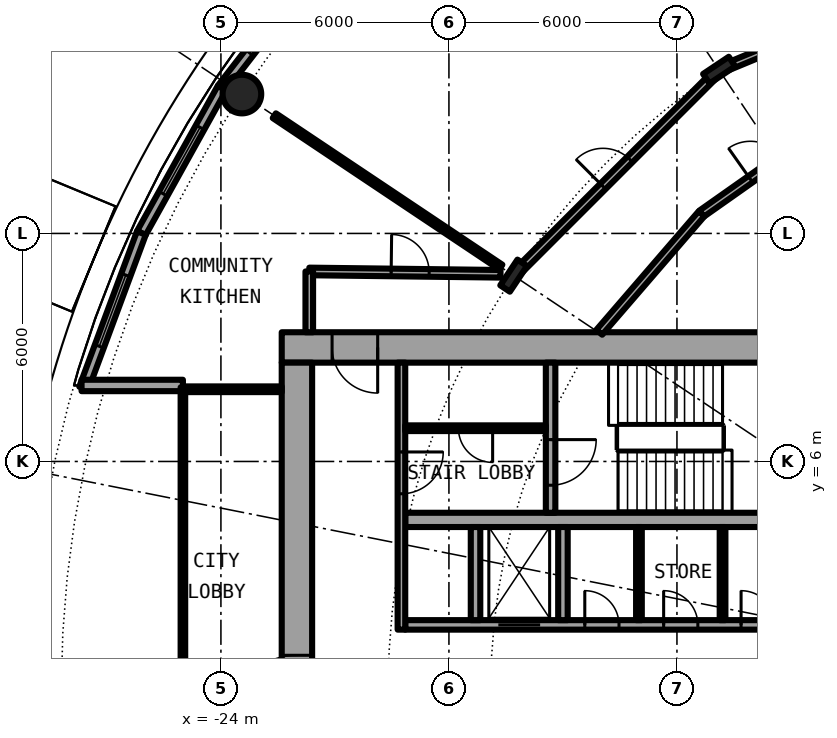
"""IFC4 building model, lengths in metres.
Left out: names, types, materials, properties, quantities, classifications, styles, units other than length and angle.
Written with IfcOpenShell. Run it as: python <this file> out.ifc"""

import sys

from ifc_helpers import new_model, si_unit, direction, frame, frame_2d, origin, origin_2d, place, context, subcontext, project, spatial, rectangle, hollow_circle, i_section, extrude, element, fill, save


model = new_model("IFC4")
c1 = context("Model", 3, precision=1e-05, world=origin(), true_north=direction((0.0, 1.0)))
c2 = subcontext(c1, "Body", "Model", "MODEL_VIEW")
j1 = project(units=[si_unit("LENGTHUNIT", "METRE"), si_unit("PLANEANGLEUNIT", "RADIAN")], contexts=[c1])
p1 = place(None, origin())
s1 = spatial("IfcSite", under=j1, at=p1, CompositionType="ELEMENT")
p2 = place(p1, origin())
s2 = spatial("IfcBuilding", under=s1, at=p2, CompositionType="ELEMENT")
p3 = place(p2, frame((0.0, 0.0, 9.6)))
s3 = spatial("IfcBuildingStorey", under=s2, at=p3, CompositionType="ELEMENT", Elevation=9.6)
p4 = place(p3, frame((-23.448, 15.667, 0.0), z_axis=(0.0, 0.0, 1.0), x_axis=(1.0, 0.0, 0.0)))
e1 = element("IfcColumn", 1, at=p4, inside=s3, PredefinedType="COLUMN", context=c2, shape_type="SweptSolid", body=[
    extrude(hollow_circle(Radius=0.508, WallThickness=0.05, at=origin_2d()), origin(), (0.0, 0.0, 1.0), 4.5),
])
for number, where, z_axis, x_axis in (
    (2, (-10.889, 16.297, 0.0), (0.0, 0.0, 1.0), (-0.556, 0.831, 0.0)),
    (3, (-16.297, 10.889, 0.0), (0.0, 0.0, 1.0), (-0.831, 0.556, 0.0)),
):
    element("IfcColumn", number, at=place(p3, frame(where, z_axis=z_axis, x_axis=x_axis)), inside=s3, PredefinedType="COLUMN", context=c2, shape_type="SweptSolid", body=[
        extrude(i_section(OverallWidth=0.303, OverallDepth=0.814, WebThickness=0.021, FlangeThickness=0.04, FilletRadius=0.03, at=origin_2d()), origin(), (0.0, 0.0, 1.0), 4.5),
    ])
p5 = place(p3, frame((-21.304, 19.268, 0.0), z_axis=(0.0, 0.0, 1.0), x_axis=(-0.612637256412, -0.790364214812, 0.0)))
e4 = element("IfcWall", 4, at=p5, inside=s3, PredefinedType="SOLIDWALL", context=c2, shape_type="SweptSolid", body=[
    extrude(rectangle(XDim=4.36, YDim=0.25, at=frame_2d((2.18, 0.0))), origin(), (0.0, 0.0, 1.0), 4.05),
])
p6 = place(p5, frame((1.18, 0.0, 0.9)))
e5 = element("IfcOpeningElement", 5, at=p6, cuts=e4, PredefinedType="OPENING", context=c2, shape_type="SweptSolid", body=[
    extrude(rectangle(XDim=2.0, YDim=2.4, at=frame_2d((1.0, 1.2))), frame((0.0, 0.135, 0.0), z_axis=(0.0, -1.0, 0.0), x_axis=(1.0, 0.0, 0.0)), (0.0, 0.0, 1.0), 0.27),
])
p7 = place(p3, frame((-23.975, 15.822, 0.0), z_axis=(0.0, 0.0, 1.0), x_axis=(-0.485761785263, -0.8740912355, 0.0)))
e6 = element("IfcWall", 6, at=p7, inside=s3, PredefinedType="SOLIDWALL", context=c2, shape_type="SweptSolid", body=[
    extrude(rectangle(XDim=4.36, YDim=0.25, at=frame_2d((2.18, 0.0))), origin(), (0.0, 0.0, 1.0), 4.05),
])
p8 = place(p7, frame((1.18, 0.0, 0.9)))
e7 = element("IfcOpeningElement", 7, at=p8, cuts=e6, PredefinedType="OPENING", context=c2, shape_type="SweptSolid", body=[
    extrude(rectangle(XDim=2.0, YDim=2.4, at=frame_2d((1.0, 1.2))), frame((0.0, 0.135, 0.0), z_axis=(0.0, -1.0, 0.0), x_axis=(1.0, 0.0, 0.0)), (0.0, 0.0, 1.0), 0.27),
])
p9 = place(p3, frame((-26.093, 12.011, 0.0), z_axis=(0.0, 0.0, 1.0), x_axis=(-0.348003729264, -0.937493148998, 0.0)))
e8 = element("IfcWall", 8, at=p9, inside=s3, PredefinedType="SOLIDWALL", context=c2, shape_type="SweptSolid", body=[
    extrude(rectangle(XDim=4.359, YDim=0.25, at=frame_2d((2.18, 0.0))), origin(), (0.0, 0.0, 1.0), 4.05),
])
p10 = place(p9, frame((1.18, 0.0, 0.9)))
e9 = element("IfcOpeningElement", 9, at=p10, cuts=e8, PredefinedType="OPENING", context=c2, shape_type="SweptSolid", body=[
    extrude(rectangle(XDim=2.0, YDim=2.4, at=frame_2d((1.0, 1.2))), frame((0.0, 0.135, 0.0), z_axis=(0.0, -1.0, 0.0), x_axis=(1.0, 0.0, 0.0)), (0.0, 0.0, 1.0), 0.27),
])
p11 = place(p3, frame((-25.0, 8.0, 0.0), z_axis=(0.0, 0.0, 1.0), x_axis=(-1.0, 0.0, 0.0)))
e10 = element("IfcWall", 10, at=p11, inside=s3, PredefinedType="SOLIDWALL", context=c2, shape_type="SweptSolid", body=[
    extrude(rectangle(XDim=2.667, YDim=0.3, at=frame_2d((1.333, 0.0))), origin(), (0.0, 0.0, 1.0), 4.05),
])
p12 = place(p3, frame((-8.2, 9.0, 0.0), z_axis=(0.0, 0.0, 1.0), x_axis=(-1.0, 0.0, 0.0)))
e11 = element("IfcWall", 11, at=p12, inside=s3, PredefinedType="SHEAR", context=c2, shape_type="SweptSolid", body=[
    extrude(rectangle(XDim=14.2, YDim=0.8, at=frame_2d((7.1, 0.0))), origin(), (0.0, 0.0, 1.0), 4.5),
])
p13 = place(p12, frame((11.675, 0.0, 0.0)))
e12 = element("IfcOpeningElement", 12, at=p13, cuts=e11, PredefinedType="OPENING", context=c2, shape_type="SweptSolid", body=[
    extrude(rectangle(XDim=1.2, YDim=2.3, at=frame_2d((0.6, 1.15))), frame((0.0, 0.41, 0.0), z_axis=(0.0, -1.0, 0.0), x_axis=(1.0, 0.0, 0.0)), (0.0, 0.0, 1.0), 0.82),
])
p14 = place(p3, frame((-22.0, -8.6, 0.0), z_axis=(0.0, 0.0, 1.0), x_axis=(0.0, 1.0, 0.0)))
e13 = element("IfcWall", 13, at=p14, inside=s3, PredefinedType="SHEAR", context=c2, shape_type="SweptSolid", body=[
    extrude(rectangle(XDim=17.2, YDim=0.8, at=frame_2d((8.6, 0.0))), origin(), (0.0, 0.0, 1.0), 4.5),
])
p15 = place(p14, frame((7.7, 0.0, 0.0)))
e14 = element("IfcOpeningElement", 14, at=p15, cuts=e13, PredefinedType="OPENING", context=c2, shape_type="SweptSolid", body=[
    extrude(rectangle(XDim=1.8, YDim=2.3, at=frame_2d((0.9, 1.15))), frame((0.0, 0.41, 0.0), z_axis=(0.0, -1.0, 0.0), x_axis=(1.0, 0.0, 0.0)), (0.0, 0.0, 1.0), 0.82),
])
p16 = place(p3, frame((-19.15, 1.7, 0.0), z_axis=(0.0, 0.0, 1.0), x_axis=(1.0, 0.0, 0.0)))
e15 = element("IfcWall", 15, at=p16, inside=s3, PredefinedType="SHEAR", context=c2, shape_type="SweptSolid", body=[
    extrude(rectangle(XDim=10.15, YDim=0.25, at=frame_2d((5.075, 0.0))), origin(), (0.0, 0.0, 1.0), 4.5),
])
p17 = place(p16, frame((2.45, 0.0, 0.0)))
e16 = element("IfcOpeningElement", 16, at=p17, cuts=e15, PredefinedType="OPENING", context=c2, shape_type="SweptSolid", body=[
    extrude(rectangle(XDim=1.1, YDim=2.3, at=frame_2d((0.55, 1.15))), frame((0.0, 0.135, 0.0), z_axis=(0.0, -1.0, 0.0), x_axis=(1.0, 0.0, 0.0)), (0.0, 0.0, 1.0), 0.27),
])
p18 = place(p16, frame((8.837, 0.0, 0.0)))
e17 = element("IfcOpeningElement", 17, at=p18, cuts=e15, PredefinedType="OPENING", context=c2, shape_type="SweptSolid", body=[
    extrude(rectangle(XDim=0.9, YDim=2.3, at=frame_2d((0.45, 1.15))), frame((0.0, 0.135, 0.0), z_axis=(0.0, -1.0, 0.0), x_axis=(1.0, 0.0, 0.0)), (0.0, 0.0, 1.0), 0.27),
])
p19 = place(p16, frame((6.8, 0.0, 0.0)))
e18 = element("IfcOpeningElement", 18, at=p19, cuts=e15, PredefinedType="OPENING", context=c2, shape_type="SweptSolid", body=[
    extrude(rectangle(XDim=0.9, YDim=2.3, at=frame_2d((0.45, 1.15))), frame((0.0, 0.135, 0.0), z_axis=(0.0, -1.0, 0.0), x_axis=(1.0, 0.0, 0.0)), (0.0, 0.0, 1.0), 0.27),
])
p20 = place(p16, frame((4.725, 0.0, 0.0)))
e19 = element("IfcOpeningElement", 19, at=p20, cuts=e15, PredefinedType="OPENING", context=c2, shape_type="SweptSolid", body=[
    extrude(rectangle(XDim=0.9, YDim=2.3, at=frame_2d((0.45, 1.15))), frame((0.0, 0.135, 0.0), z_axis=(0.0, -1.0, 0.0), x_axis=(1.0, 0.0, 0.0)), (0.0, 0.0, 1.0), 0.27),
])
p21 = place(p3, frame((-9.0, 4.462, 0.0), z_axis=(0.0, 0.0, 1.0), x_axis=(-1.0, 0.0, 0.0)))
e20 = element("IfcWall", 20, at=p21, inside=s3, PredefinedType="SHEAR", context=c2, shape_type="SweptSolid", body=[
    extrude(rectangle(XDim=10.15, YDim=0.375, at=frame_2d((5.075, 0.0))), origin(), (0.0, 0.0, 1.0), 4.5),
])
p22 = place(p3, frame((-15.325, 8.6, 0.0), z_axis=(0.0, 0.0, 1.0), x_axis=(0.0, -1.0, 0.0)))
e21 = element("IfcWall", 21, at=p22, inside=s3, PredefinedType="SHEAR", context=c2, shape_type="SweptSolid", body=[
    extrude(rectangle(XDim=3.95, YDim=0.25, at=frame_2d((1.975, 0.0))), origin(), (0.0, 0.0, 1.0), 4.5),
])
p23 = place(p22, frame((2.025, 0.0, 0.0)))
e22 = element("IfcOpeningElement", 22, at=p23, cuts=e21, PredefinedType="OPENING", context=c2, shape_type="SweptSolid", body=[
    extrude(rectangle(XDim=1.2, YDim=2.3, at=frame_2d((0.6, 1.15))), frame((0.0, 0.135, 0.0), z_axis=(0.0, -1.0, 0.0), x_axis=(1.0, 0.0, 0.0)), (0.0, 0.0, 1.0), 0.27),
])
for number, where, z_axis, x_axis in (
    (23, (-15.0, 1.825, 0.0), (0.0, 0.0, 1.0), (0.0, 1.0, 0.0)),
    (24, (-17.3, 1.825, 0.0), (0.0, 0.0, 1.0), (0.0, 1.0, 0.0)),
):
    element("IfcWall", number, at=place(p3, frame(where, z_axis=z_axis, x_axis=x_axis)), inside=s3, PredefinedType="SOLIDWALL", context=c2, shape_type="SweptSolid", body=[
        extrude(rectangle(XDim=2.45, YDim=0.25, at=frame_2d((1.225, 0.0))), origin(), (0.0, 0.0, 1.0), 4.05),
    ])
p24 = place(p3, frame((-19.25, 8.6, 0.0), z_axis=(0.0, 0.0, 1.0), x_axis=(0.0, -1.0, 0.0)))
e25 = element("IfcWall", 25, at=p24, inside=s3, PredefinedType="SOLIDWALL", context=c2, shape_type="SweptSolid", body=[
    extrude(rectangle(XDim=7.025, YDim=0.2, at=frame_2d((3.513, 0.0))), origin(), (0.0, 0.0, 1.0), 4.05),
])
p25 = place(p24, frame((2.35, 0.0, 0.0)))
e26 = element("IfcOpeningElement", 26, at=p25, cuts=e25, PredefinedType="OPENING", context=c2, shape_type="SweptSolid", body=[
    extrude(rectangle(XDim=1.1, YDim=2.3, at=frame_2d((0.55, 1.15))), frame((0.0, 0.11, 0.0), z_axis=(0.0, -1.0, 0.0), x_axis=(1.0, 0.0, 0.0)), (0.0, 0.0, 1.0), 0.22),
])
for number, where, z_axis, x_axis in (
    (27, (-10.8, 1.825, 0.0), (0.0, 0.0, 1.0), (0.0, 1.0, 0.0)),
    (28, (-13.0, 1.825, 0.0), (0.0, 0.0, 1.0), (0.0, 1.0, 0.0)),
):
    element("IfcWall", number, at=place(p3, frame(where, z_axis=z_axis, x_axis=x_axis)), inside=s3, PredefinedType="PARTITIONING", context=c2, shape_type="SweptSolid", body=[
        extrude(rectangle(XDim=2.45, YDim=0.15, at=frame_2d((1.225, 0.0))), origin(), (0.0, 0.0, 1.0), 4.05),
    ])
p26 = place(p3, frame((-15.45, 6.875, 0.0), z_axis=(0.0, 0.0, 1.0), x_axis=(-1.0, 0.0, 0.0)))
e29 = element("IfcWall", 29, at=p26, inside=s3, PredefinedType="PARTITIONING", context=c2, shape_type="SweptSolid", body=[
    extrude(rectangle(XDim=3.7, YDim=0.15, at=frame_2d((1.85, 0.0))), origin(), (0.0, 0.0, 1.0), 4.05),
])
p27 = place(p26, frame((1.4, 0.0, 0.0)))
e30 = element("IfcOpeningElement", 30, at=p27, cuts=e29, PredefinedType="OPENING", context=c2, shape_type="SweptSolid", body=[
    extrude(rectangle(XDim=0.9, YDim=2.3, at=frame_2d((0.45, 1.15))), frame((0.0, 0.085, 0.0), z_axis=(0.0, -1.0, 0.0), x_axis=(1.0, 0.0, 0.0)), (0.0, 0.0, 1.0), 0.17),
])
p28 = place(p3, frame((-22.4, 7.9, 0.0), z_axis=(0.0, 0.0, 1.0), x_axis=(-1.0, 0.0, 0.0)))
e31 = element("IfcWall", 31, at=p28, inside=s3, PredefinedType="PARTITIONING", context=c2, shape_type="SweptSolid", body=[
    extrude(rectangle(XDim=2.54, YDim=0.15, at=frame_2d((1.27, 0.0))), origin(), (0.0, 0.0, 1.0), 4.05),
])
p29 = place(p3, frame((-25.0, 7.95, 0.0), z_axis=(0.0, 0.0, 1.0), x_axis=(0.0, -1.0, 0.0)))
e32 = element("IfcWall", 32, at=p29, inside=s3, PredefinedType="PARTITIONING", context=c2, shape_type="SweptSolid", body=[
    extrude(rectangle(XDim=15.9, YDim=0.12, at=frame_2d((7.95, 0.0))), origin(), (0.0, 0.0, 1.0), 4.05),
])
p30 = place(p29, frame((0.95, 0.0, 0.1)))
e33 = element("IfcOpeningElement", 33, at=p30, cuts=e32, PredefinedType="OPENING", context=c2, shape_type="SweptSolid", body=[
    extrude(rectangle(XDim=14.0, YDim=3.7, at=frame_2d((7.0, 1.85))), frame((0.0, 0.07, 0.0), z_axis=(0.0, -1.0, 0.0), x_axis=(1.0, 0.0, 0.0)), (0.0, 0.0, 1.0), 0.14),
])
p31 = place(p3, frame((-22.595, 15.098, 0.0), z_axis=(0.0, 0.0, 1.0), x_axis=(0.831431488123, -0.555627285648, 0.0)))
e34 = element("IfcWall", 34, at=p31, inside=s3, PredefinedType="PARTITIONING", context=c2, shape_type="SweptSolid", body=[
    extrude(rectangle(XDim=7.168, YDim=0.15, at=frame_2d((3.584, 0.0))), origin(), (0.0, 0.0, 1.0), 4.05),
])
p32 = place(p3, frame((-21.675, 11.0, 0.0), z_axis=(0.0, 0.0, 1.0), x_axis=(0.999924074118, -0.012322580895, 0.0)))
e35 = element("IfcWall", 35, at=p32, inside=s3, PredefinedType="PARTITIONING", context=c2, shape_type="SweptSolid", body=[
    extrude(rectangle(XDim=5.032, YDim=0.2, at=frame_2d((2.516, 0.0))), origin(), (0.0, 0.0, 1.0), 4.05),
])
p33 = place(p32, frame((2.155, 0.0, 0.0)))
e36 = element("IfcOpeningElement", 36, at=p33, cuts=e35, PredefinedType="OPENING", context=c2, shape_type="SweptSolid", body=[
    extrude(rectangle(XDim=1.0, YDim=2.3, at=frame_2d((0.5, 1.15))), frame((0.0, 0.11, 0.0), z_axis=(0.0, -1.0, 0.0), x_axis=(1.0, 0.0, 0.0)), (0.0, 0.0, 1.0), 0.22),
])
p34 = place(p3, frame((-14.043, 9.4, 0.0), z_axis=(0.0, 0.0, 1.0), x_axis=(0.653274518104, 0.757121129012, 0.0)))
e37 = element("IfcWall", 37, at=p34, inside=s3, PredefinedType="PARTITIONING", context=c2, shape_type="SweptSolid", body=[
    extrude(rectangle(XDim=4.124, YDim=0.2, at=frame_2d((2.062, 0.0))), origin(), (0.0, 0.0, 1.0), 4.05),
])
p35 = place(p3, frame((-11.349, 12.522, 0.0), z_axis=(0.0, 0.0, 1.0), x_axis=(0.817567680547, 0.575832517079, 0.0)))
e38 = element("IfcWall", 38, at=p35, inside=s3, PredefinedType="PARTITIONING", context=c2, shape_type="SweptSolid", body=[
    extrude(rectangle(XDim=4.137, YDim=0.2, at=frame_2d((2.068, 0.0))), origin(), (0.0, 0.0, 1.0), 4.05),
])
p36 = place(p35, frame((1.568, 0.0, 0.0)))
e39 = element("IfcOpeningElement", 39, at=p36, cuts=e38, PredefinedType="OPENING", context=c2, shape_type="SweptSolid", body=[
    extrude(rectangle(XDim=1.0, YDim=2.3, at=frame_2d((0.5, 1.15))), frame((0.0, 0.11, 0.0), z_axis=(0.0, -1.0, 0.0), x_axis=(1.0, 0.0, 0.0)), (0.0, 0.0, 1.0), 0.22),
])
p37 = place(p3, frame((-16.188, 10.998, 0.0), z_axis=(0.0, 0.0, 1.0), x_axis=(0.707106781187, 0.707106781187, 0.0)))
e40 = element("IfcWall", 40, at=p37, inside=s3, PredefinedType="PARTITIONING", context=c2, shape_type="SweptSolid", body=[
    extrude(rectangle(XDim=7.34, YDim=0.2, at=frame_2d((3.67, 0.0))), origin(), (0.0, 0.0, 1.0), 3.63),
])
p38 = place(p37, frame((3.17, 0.0, 0.0)))
e41 = element("IfcOpeningElement", 41, at=p38, cuts=e40, PredefinedType="OPENING", context=c2, shape_type="SweptSolid", body=[
    extrude(rectangle(XDim=1.0, YDim=2.3, at=frame_2d((0.5, 1.15))), frame((0.0, 0.11, 0.0), z_axis=(0.0, -1.0, 0.0), x_axis=(1.0, 0.0, 0.0)), (0.0, 0.0, 1.0), 0.22),
])
p39 = place(p3, frame((-10.747, 16.356, 0.0), z_axis=(0.0, 0.0, 1.0), x_axis=(0.923916253875, 0.382594767117, 0.0)))
e42 = element("IfcWall", 42, at=p39, inside=s3, PredefinedType="PARTITIONING", context=c2, shape_type="SweptSolid", body=[
    extrude(rectangle(XDim=6.626, YDim=0.2, at=frame_2d((3.313, 0.0))), origin(), (0.0, 0.0, 1.0), 3.63),
])
p40 = place(p3, frame((-21.675, 9.4, 0.0), z_axis=(0.0, 0.0, 1.0), x_axis=(0.0, 1.0, 0.0)))
e43 = element("IfcWall", 43, at=p40, inside=s3, PredefinedType="PARTITIONING", context=c2, shape_type="SweptSolid", body=[
    extrude(rectangle(XDim=1.6, YDim=0.2, at=frame_2d((0.8, 0.0))), origin(), (0.0, 0.0, 1.0), 4.05),
])
p41 = place(p6, origin())
e44 = element("IfcWindow", 44, at=p41, inside=s3, PartitioningType="SINGLE_PANEL", PredefinedType="WINDOW", context=c2, shape_type="SweptSolid", body=[
    extrude(rectangle(XDim=2.0, YDim=2.4, at=frame_2d((1.0, 1.2))), frame((0.0, 0.03, 0.0), z_axis=(0.0, -1.0, 0.0), x_axis=(1.0, 0.0, 0.0)), (0.0, 0.0, 1.0), 0.06),
])
fill(e5, e44)
p42 = place(p8, origin())
e45 = element("IfcWindow", 45, at=p42, inside=s3, PartitioningType="SINGLE_PANEL", PredefinedType="WINDOW", context=c2, shape_type="SweptSolid", body=[
    extrude(rectangle(XDim=2.0, YDim=2.4, at=frame_2d((1.0, 1.2))), frame((0.0, 0.03, 0.0), z_axis=(0.0, -1.0, 0.0), x_axis=(1.0, 0.0, 0.0)), (0.0, 0.0, 1.0), 0.06),
])
fill(e7, e45)
p43 = place(p10, origin())
e46 = element("IfcWindow", 46, at=p43, inside=s3, PartitioningType="SINGLE_PANEL", PredefinedType="WINDOW", context=c2, shape_type="SweptSolid", body=[
    extrude(rectangle(XDim=2.0, YDim=2.4, at=frame_2d((1.0, 1.2))), frame((0.0, 0.03, 0.0), z_axis=(0.0, -1.0, 0.0), x_axis=(1.0, 0.0, 0.0)), (0.0, 0.0, 1.0), 0.06),
])
fill(e9, e46)
p44 = place(p17, origin())
e47 = element("IfcDoor", 47, at=p44, inside=s3, OperationType="DOUBLE_DOOR_SLIDING", PredefinedType="DOOR", context=c2, shape_type="SweptSolid", body=[
    extrude(rectangle(XDim=1.1, YDim=2.3, at=frame_2d((0.55, 1.15))), frame((0.0, 0.025, 0.0), z_axis=(0.0, -1.0, 0.0), x_axis=(1.0, 0.0, 0.0)), (0.0, 0.0, 1.0), 0.05),
])
fill(e16, e47)
p45 = place(p18, origin())
e48 = element("IfcDoor", 48, at=p45, inside=s3, OperationType="SINGLE_SWING_LEFT", PredefinedType="DOOR", context=c2, shape_type="SweptSolid", body=[
    extrude(rectangle(XDim=0.9, YDim=2.3, at=frame_2d((0.45, 1.15))), frame((0.0, 0.025, 0.0), z_axis=(0.0, -1.0, 0.0), x_axis=(1.0, 0.0, 0.0)), (0.0, 0.0, 1.0), 0.05),
])
fill(e17, e48)
p46 = place(p19, origin())
e49 = element("IfcDoor", 49, at=p46, inside=s3, OperationType="SINGLE_SWING_LEFT", PredefinedType="DOOR", context=c2, shape_type="SweptSolid", body=[
    extrude(rectangle(XDim=0.9, YDim=2.3, at=frame_2d((0.45, 1.15))), frame((0.0, 0.025, 0.0), z_axis=(0.0, -1.0, 0.0), x_axis=(1.0, 0.0, 0.0)), (0.0, 0.0, 1.0), 0.05),
])
fill(e18, e49)
p47 = place(p20, origin())
e50 = element("IfcDoor", 50, at=p47, inside=s3, OperationType="SINGLE_SWING_LEFT", PredefinedType="DOOR", context=c2, shape_type="SweptSolid", body=[
    extrude(rectangle(XDim=0.9, YDim=2.3, at=frame_2d((0.45, 1.15))), frame((0.0, 0.025, 0.0), z_axis=(0.0, -1.0, 0.0), x_axis=(1.0, 0.0, 0.0)), (0.0, 0.0, 1.0), 0.05),
])
fill(e19, e50)
p48 = place(p27, origin())
e51 = element("IfcDoor", 51, at=p48, inside=s3, OperationType="SINGLE_SWING_LEFT", PredefinedType="DOOR", context=c2, shape_type="SweptSolid", body=[
    extrude(rectangle(XDim=0.9, YDim=2.3, at=frame_2d((0.45, 1.15))), frame((0.0, 0.025, 0.0), z_axis=(0.0, -1.0, 0.0), x_axis=(1.0, 0.0, 0.0)), (0.0, 0.0, 1.0), 0.05),
])
fill(e30, e51)
p49 = place(p23, origin())
e52 = element("IfcDoor", 52, at=p49, inside=s3, OperationType="SINGLE_SWING_LEFT", PredefinedType="DOOR", context=c2, shape_type="SweptSolid", body=[
    extrude(rectangle(XDim=1.2, YDim=2.3, at=frame_2d((0.6, 1.15))), frame((0.0, 0.025, 0.0), z_axis=(0.0, -1.0, 0.0), x_axis=(1.0, 0.0, 0.0)), (0.0, 0.0, 1.0), 0.05),
])
fill(e22, e52)
p50 = place(p25, origin())
e53 = element("IfcDoor", 53, at=p50, inside=s3, OperationType="SINGLE_SWING_RIGHT", PredefinedType="DOOR", context=c2, shape_type="SweptSolid", body=[
    extrude(rectangle(XDim=1.1, YDim=2.3, at=frame_2d((0.55, 1.15))), frame((0.0, 0.025, 0.0), z_axis=(0.0, -1.0, 0.0), x_axis=(1.0, 0.0, 0.0)), (0.0, 0.0, 1.0), 0.05),
])
fill(e26, e53)
p51 = place(p13, origin())
e54 = element("IfcDoor", 54, at=p51, inside=s3, OperationType="SINGLE_SWING_LEFT", PredefinedType="DOOR", context=c2, shape_type="SweptSolid", body=[
    extrude(rectangle(XDim=1.2, YDim=2.3, at=frame_2d((0.6, 1.15))), frame((0.0, 0.025, 0.0), z_axis=(0.0, -1.0, 0.0), x_axis=(1.0, 0.0, 0.0)), (0.0, 0.0, 1.0), 0.05),
])
fill(e12, e54)
p52 = place(p15, origin())
e55 = element("IfcDoor", 55, at=p52, inside=s3, OperationType="SINGLE_SWING_LEFT", PredefinedType="DOOR", context=c2, shape_type="SweptSolid", body=[
    extrude(rectangle(XDim=1.8, YDim=2.3, at=frame_2d((0.9, 1.15))), frame((0.0, 0.025, 0.0), z_axis=(0.0, -1.0, 0.0), x_axis=(1.0, 0.0, 0.0)), (0.0, 0.0, 1.0), 0.05),
])
fill(e14, e55)
p53 = place(p30, origin())
e56 = element("IfcWindow", 56, at=p53, inside=s3, PartitioningType="SINGLE_PANEL", PredefinedType="WINDOW", context=c2, shape_type="SweptSolid", body=[
    extrude(rectangle(XDim=14.0, YDim=3.7, at=frame_2d((7.0, 1.85))), frame((0.0, 0.03, 0.0), z_axis=(0.0, -1.0, 0.0), x_axis=(1.0, 0.0, 0.0)), (0.0, 0.0, 1.0), 0.06),
])
fill(e33, e56)
p54 = place(p38, origin())
e57 = element("IfcDoor", 57, at=p54, inside=s3, OperationType="SINGLE_SWING_RIGHT", PredefinedType="DOOR", context=c2, shape_type="SweptSolid", body=[
    extrude(rectangle(XDim=1.0, YDim=2.3, at=frame_2d((0.5, 1.15))), frame((0.0, 0.025, 0.0), z_axis=(0.0, -1.0, 0.0), x_axis=(1.0, 0.0, 0.0)), (0.0, 0.0, 1.0), 0.05),
])
fill(e41, e57)
p55 = place(p36, origin())
e58 = element("IfcDoor", 58, at=p55, inside=s3, OperationType="SINGLE_SWING_RIGHT", PredefinedType="DOOR", context=c2, shape_type="SweptSolid", body=[
    extrude(rectangle(XDim=1.0, YDim=2.3, at=frame_2d((0.5, 1.15))), frame((0.0, 0.025, 0.0), z_axis=(0.0, -1.0, 0.0), x_axis=(1.0, 0.0, 0.0)), (0.0, 0.0, 1.0), 0.05),
])
fill(e39, e58)
p56 = place(p33, origin())
e59 = element("IfcDoor", 59, at=p56, inside=s3, OperationType="SINGLE_SWING_RIGHT", PredefinedType="DOOR", context=c2, shape_type="SweptSolid", body=[
    extrude(rectangle(XDim=1.0, YDim=2.3, at=frame_2d((0.5, 1.15))), frame((0.0, 0.025, 0.0), z_axis=(0.0, -1.0, 0.0), x_axis=(1.0, 0.0, 0.0)), (0.0, 0.0, 1.0), 0.05),
])
fill(e36, e59)
save(model, sys.argv[1])
